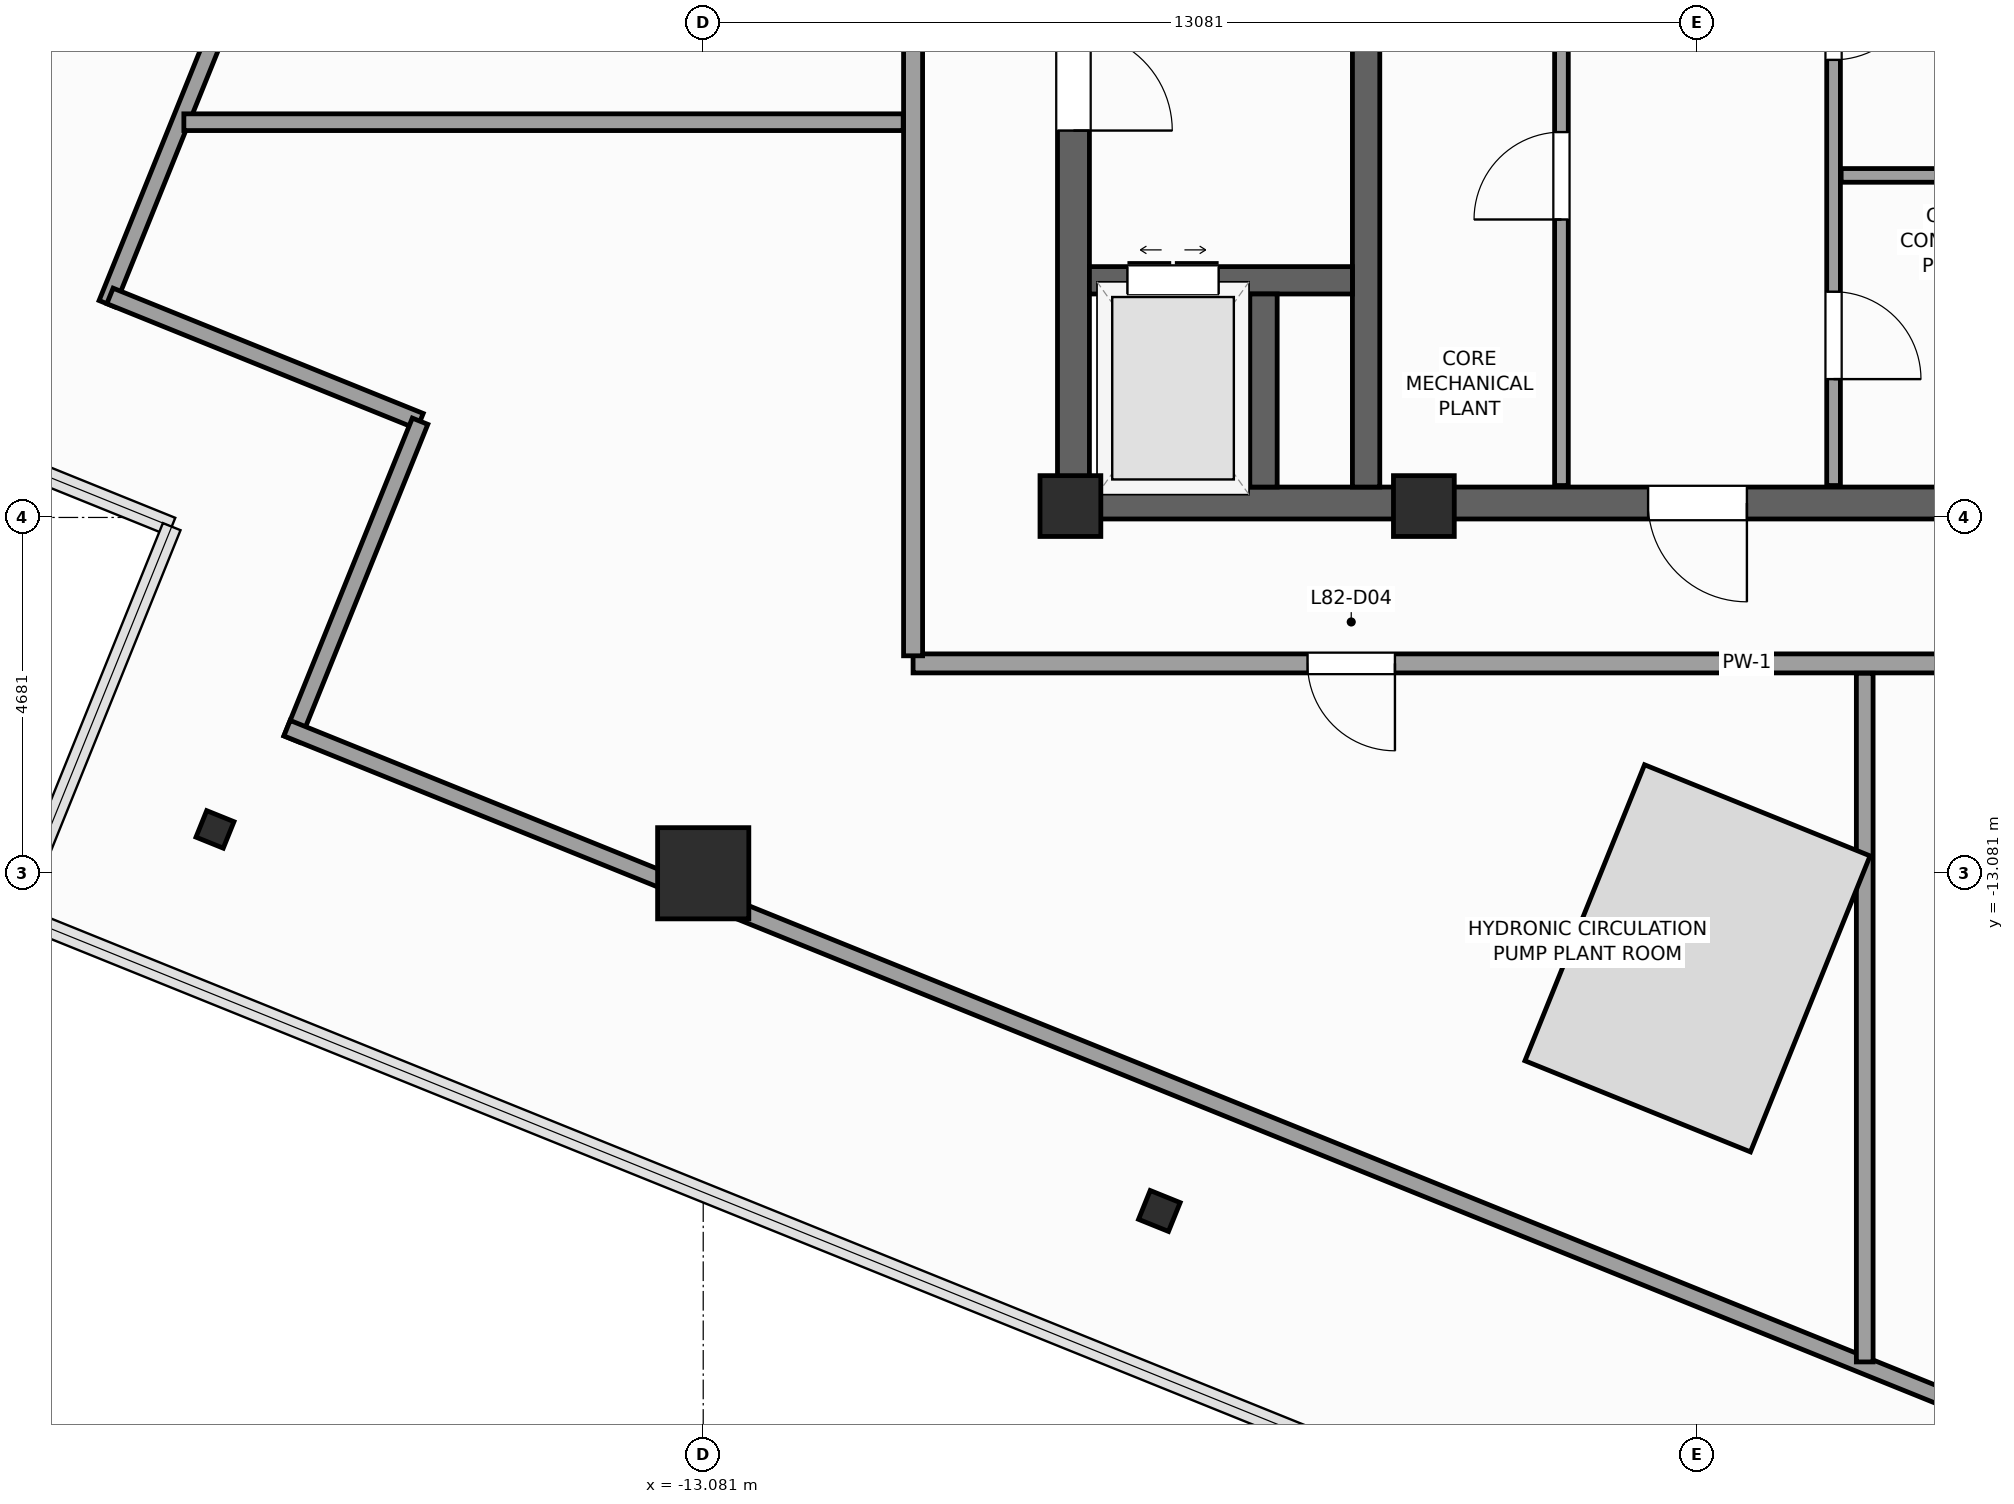
"""IFC4 building model, lengths in metres.
Left out: names, types, materials, properties, quantities, classifications, styles, units other than length and angle.
Written with IfcOpenShell. Run it as: python <this file> out.ifc"""

import sys

from ifc_helpers import new_model, si_unit, direction, frame, frame_2d, origin, origin_2d, place, context, subcontext, project, spatial, rectangle, i_section, extrude, source, transform, mapped, element, fill, save


model = new_model("IFC4")
c1 = context("Model", 3, precision=1e-05, world=origin(), true_north=direction((0.0, 1.0)))
c2 = subcontext(c1, "Body", "Model", "MODEL_VIEW")
j1 = project(units=[si_unit("LENGTHUNIT", "METRE"), si_unit("PLANEANGLEUNIT", "RADIAN")], contexts=[c1])
p1 = place(None, origin())
s1 = spatial("IfcSite", under=j1, at=p1, CompositionType="ELEMENT")
p2 = place(p1, origin())
s2 = spatial("IfcBuilding", under=s1, at=p2, CompositionType="ELEMENT")
p3 = place(p2, frame((0.0, 0.0, 333.6)))
s3 = spatial("IfcBuildingStorey", under=s2, at=p3, CompositionType="ELEMENT", Elevation=333.6)
p4 = place(p3, frame((-8.42, -8.21, 0.0), z_axis=(0.0, 0.0, 1.0), x_axis=(1.0, 0.0, 0.0)))
e1 = element("IfcWall", 1, at=p4, inside=s3, PredefinedType="SHEAR", context=c2, shape_type="SweptSolid", body=[
    extrude(rectangle(XDim=16.84, YDim=0.42, at=frame_2d((8.42, 0.0))), origin(), (0.0, 0.0, 1.0), 4.0),
])
p5 = place(p4, frame((7.77, 0.0, 0.0)))
e2 = element("IfcOpeningElement", 2, at=p5, cuts=e1, PredefinedType="OPENING", context=c2, shape_type="SweptSolid", body=[
    extrude(rectangle(XDim=1.3, YDim=2.2, at=frame_2d((0.65, 1.1))), frame((0.0, 0.22, 0.0), z_axis=(0.0, -1.0, 0.0), x_axis=(1.0, 0.0, 0.0)), (0.0, 0.0, 1.0), 0.44),
])
p6 = place(p3, frame((-8.21, -8.0, 0.0), z_axis=(0.0, 0.0, 1.0), x_axis=(0.0, 1.0, 0.0)))
e3 = element("IfcWall", 3, at=p6, inside=s3, PredefinedType="SHEAR", context=c2, shape_type="SweptSolid", body=[
    extrude(rectangle(XDim=16.0, YDim=0.42, at=frame_2d((8.0, 0.0))), origin(), (0.0, 0.0, 1.0), 4.0),
])
p7 = place(p6, frame((4.69, 0.0, 0.0)))
e4 = element("IfcOpeningElement", 4, at=p7, cuts=e3, PredefinedType="OPENING", context=c2, shape_type="SweptSolid", body=[
    extrude(rectangle(XDim=1.3, YDim=2.2, at=frame_2d((0.65, 1.1))), frame((0.0, 0.22, 0.0), z_axis=(0.0, -1.0, 0.0), x_axis=(1.0, 0.0, 0.0)), (0.0, 0.0, 1.0), 0.44),
])
p8 = place(p3, frame((-4.36, -8.0, 0.0), z_axis=(0.0, 0.0, 1.0), x_axis=(0.0, 1.0, 0.0)))
e5 = element("IfcWall", 5, at=p8, inside=s3, PredefinedType="SHEAR", context=c2, shape_type="SweptSolid", body=[
    extrude(rectangle(XDim=16.0, YDim=0.36, at=frame_2d((8.0, 0.0))), origin(), (0.0, 0.0, 1.0), 4.0),
])
p9 = place(p3, frame((-8.0, -5.28, 0.0), z_axis=(0.0, 0.0, 1.0), x_axis=(1.0, 0.0, 0.0)))
e6 = element("IfcWall", 6, at=p9, inside=s3, PredefinedType="SHEAR", context=c2, shape_type="SweptSolid", body=[
    extrude(rectangle(XDim=3.46, YDim=0.36, at=frame_2d((1.73, 0.0))), origin(), (0.0, 0.0, 1.0), 4.0),
])
p10 = place(p9, frame((0.5, 0.0, 0.0)))
e7 = element("IfcOpeningElement", 7, at=p10, cuts=e6, PredefinedType="OPENING", context=c2, shape_type="SweptSolid", body=[
    extrude(rectangle(XDim=1.2, YDim=2.25, at=frame_2d((0.6, 1.125))), frame((0.0, 0.19, 0.0), z_axis=(0.0, -1.0, 0.0), x_axis=(1.0, 0.0, 0.0)), (0.0, 0.0, 1.0), 0.38),
])
p11 = place(p3, frame((-5.71, -8.0, 0.0), z_axis=(0.0, 0.0, 1.0), x_axis=(0.0, 1.0, 0.0)))
e8 = element("IfcWall", 8, at=p11, inside=s3, PredefinedType="SHEAR", context=c2, shape_type="SweptSolid", body=[
    extrude(rectangle(XDim=2.54, YDim=0.36, at=frame_2d((1.27, 0.0))), origin(), (0.0, 0.0, 1.0), 4.0),
])
m1 = source(origin(), c2, "Body", "SweptSolid", [
    extrude(rectangle(XDim=0.8, YDim=0.8, at=origin_2d()), origin(), (0.0, 0.0, 1.0), 4.0),
])
for number, where, z_axis, x_axis in (
    (9, (-8.25, -8.25, 0.0), (0.0, 0.0, 1.0), (1.0, 0.0, 0.0)),
    (10, (-3.6, -8.25, 0.0), (0.0, 0.0, 1.0), (1.0, 0.0, 0.0)),
):
    element("IfcColumn", number, at=place(p3, frame(where, z_axis=z_axis, x_axis=x_axis)), inside=s3, PredefinedType="PILASTER", context=c2, shape_type="MappedRepresentation", body=[
        mapped(m1, transform((0.0, 0.0, 0.0), scale=1.0)),
    ])
m2 = source(origin(), c2, "Body", "SweptSolid", [
    extrude(rectangle(XDim=1.2, YDim=1.2, at=origin_2d()), origin(), (0.0, 0.0, 1.0), 4.0),
])
p12 = place(p3, frame((-13.081, -13.081, 0.0), z_axis=(0.0, 0.0, 1.0), x_axis=(1.0, 0.0, 0.0)))
e11 = element("IfcColumn", 11, at=p12, inside=s3, PredefinedType="COLUMN", context=c2, shape_type="MappedRepresentation", body=[
    mapped(m2, transform((0.0, 0.0, 0.0), scale=1.0)),
])
m3 = source(origin(), c2, "Body", "SweptSolid", [
    extrude(i_section(OverallWidth=0.376, OverallDepth=0.387, WebThickness=0.02, FlangeThickness=0.032, FilletRadius=0.015, at=origin_2d()), origin(), (0.0, 0.0, 1.0), 4.0),
])
p13 = place(p3, frame((-19.504, -12.504, 0.0), z_axis=(0.0, 0.0, 1.0), x_axis=(0.374606593416, 0.927183854567, 0.0)))
e12 = element("IfcColumn", 12, at=p13, inside=s3, PredefinedType="COLUMN", context=c2, shape_type="MappedRepresentation", body=[
    mapped(m3, transform((0.0, 0.0, 0.0), scale=1.0)),
])
m4 = source(origin(), c2, "Body", "SweptSolid", [
    extrude(i_section(OverallWidth=0.409, OverallDepth=0.425, WebThickness=0.024, FlangeThickness=0.039, FilletRadius=0.015, at=origin_2d()), origin(), (0.0, 0.0, 1.0), 4.0),
])
p14 = place(p3, frame((-7.08, -17.524, 0.0), z_axis=(0.0, 0.0, 1.0), x_axis=(0.374606593416, 0.927183854567, 0.0)))
e13 = element("IfcColumn", 13, at=p14, inside=s3, PredefinedType="COLUMN", context=c2, shape_type="MappedRepresentation", body=[
    mapped(m4, transform((0.0, 0.0, 0.0), scale=1.0)),
])
p15 = place(p3, frame((-1.79, -7.98, 0.0), z_axis=(0.0, 0.0, 1.0), x_axis=(0.0, 1.0, 0.0)))
e14 = element("IfcWall", 14, at=p15, inside=s3, PredefinedType="PARTITIONING", context=c2, shape_type="SweptSolid", body=[
    extrude(rectangle(XDim=12.38, YDim=0.18, at=frame_2d((6.19, 0.0))), origin(), (0.0, 0.0, 1.0), 3.7),
])
p16 = place(p15, frame((3.5, 0.0, 0.0)))
e15 = element("IfcOpeningElement", 15, at=p16, cuts=e14, PredefinedType="OPENING", context=c2, shape_type="SweptSolid", body=[
    extrude(rectangle(XDim=1.15, YDim=2.25, at=frame_2d((0.575, 1.125))), frame((0.0, 0.1, 0.0), z_axis=(0.0, -1.0, 0.0), x_axis=(1.0, 0.0, 0.0)), (0.0, 0.0, 1.0), 0.2),
])
p17 = place(p15, frame((9.8, 0.0, 0.0)))
e16 = element("IfcOpeningElement", 16, at=p17, cuts=e14, PredefinedType="OPENING", context=c2, shape_type="SweptSolid", body=[
    extrude(rectangle(XDim=1.15, YDim=2.25, at=frame_2d((0.575, 1.125))), frame((0.0, 0.1, 0.0), z_axis=(0.0, -1.0, 0.0), x_axis=(1.0, 0.0, 0.0)), (0.0, 0.0, 1.0), 0.2),
])
p18 = place(p3, frame((1.79, -7.98, 0.0), z_axis=(0.0, 0.0, 1.0), x_axis=(0.0, 1.0, 0.0)))
e17 = element("IfcWall", 17, at=p18, inside=s3, PredefinedType="PARTITIONING", context=c2, shape_type="SweptSolid", body=[
    extrude(rectangle(XDim=12.38, YDim=0.18, at=frame_2d((6.19, 0.0))), origin(), (0.0, 0.0, 1.0), 3.7),
])
p19 = place(p18, frame((1.4, 0.0, 0.0)))
e18 = element("IfcOpeningElement", 18, at=p19, cuts=e17, PredefinedType="OPENING", context=c2, shape_type="SweptSolid", body=[
    extrude(rectangle(XDim=1.15, YDim=2.25, at=frame_2d((0.575, 1.125))), frame((0.0, 0.1, 0.0), z_axis=(0.0, -1.0, 0.0), x_axis=(1.0, 0.0, 0.0)), (0.0, 0.0, 1.0), 0.2),
])
p20 = place(p18, frame((5.6, 0.0, 0.0)))
e19 = element("IfcOpeningElement", 19, at=p20, cuts=e17, PredefinedType="OPENING", context=c2, shape_type="SweptSolid", body=[
    extrude(rectangle(XDim=1.15, YDim=2.25, at=frame_2d((0.575, 1.125))), frame((0.0, 0.1, 0.0), z_axis=(0.0, -1.0, 0.0), x_axis=(1.0, 0.0, 0.0)), (0.0, 0.0, 1.0), 0.2),
])
p21 = place(p18, frame((9.8, 0.0, 0.0)))
e20 = element("IfcOpeningElement", 20, at=p21, cuts=e17, PredefinedType="OPENING", context=c2, shape_type="SweptSolid", body=[
    extrude(rectangle(XDim=1.15, YDim=2.25, at=frame_2d((0.575, 1.125))), frame((0.0, 0.1, 0.0), z_axis=(0.0, -1.0, 0.0), x_axis=(1.0, 0.0, 0.0)), (0.0, 0.0, 1.0), 0.2),
])
p22 = place(p3, frame((1.89, -3.9, 0.0), z_axis=(0.0, 0.0, 1.0), x_axis=(1.0, 0.0, 0.0)))
e21 = element("IfcWall", 21, at=p22, inside=s3, PredefinedType="PARTITIONING", context=c2, shape_type="SweptSolid", body=[
    extrude(rectangle(XDim=2.28, YDim=0.18, at=frame_2d((1.14, 0.0))), origin(), (0.0, 0.0, 1.0), 3.7),
])
p23 = place(p3, frame((-11.172, 18.556, 0.0), z_axis=(0.0, 0.0, 1.0), x_axis=(-0.374611707018, -0.927181788521, 0.0)))
e22 = element("IfcWall", 22, at=p23, inside=s3, PredefinedType="PARTITIONING", context=c2, shape_type="SweptSolid", body=[
    extrude(rectangle(XDim=26.04, YDim=0.22, at=frame_2d((13.02, 0.0))), origin(), (0.0, 0.0, 1.0), 3.05),
])
p24 = place(p3, frame((-20.886, -5.486, 0.0), z_axis=(0.0, 0.0, 1.0), x_axis=(0.927189216671, -0.374593321469, 0.0)))
e23 = element("IfcWall", 23, at=p24, inside=s3, PredefinedType="PARTITIONING", context=c2, shape_type="SweptSolid", body=[
    extrude(rectangle(XDim=4.4, YDim=0.22, at=frame_2d((2.2, 0.0))), origin(), (0.0, 0.0, 1.0), 3.7),
])
p25 = place(p3, frame((-16.806, -7.134, 0.0), z_axis=(0.0, 0.0, 1.0), x_axis=(-0.374599091925, -0.927186885331, 0.0)))
e24 = element("IfcWall", 24, at=p25, inside=s3, PredefinedType="PARTITIONING", context=c2, shape_type="SweptSolid", body=[
    extrude(rectangle(XDim=4.51, YDim=0.22, at=frame_2d((2.255, 0.0))), origin(), (0.0, 0.0, 1.0), 3.7),
])
p26 = place(p3, frame((-18.556, -11.172, 0.0), z_axis=(0.0, 0.0, 1.0), x_axis=(0.927181788521, -0.374611707018, 0.0)))
e25 = element("IfcWall", 25, at=p26, inside=s3, PredefinedType="PARTITIONING", context=c2, shape_type="SweptSolid", body=[
    extrude(rectangle(XDim=26.04, YDim=0.22, at=frame_2d((13.02, 0.0))), origin(), (0.0, 0.0, 1.0), 3.05),
])
p27 = place(p3, frame((-10.32, -10.32, 0.0), z_axis=(0.0, 0.0, 1.0), x_axis=(1.0, 0.0, 0.0)))
e26 = element("IfcWall", 26, at=p27, inside=s3, PredefinedType="PARTITIONING", context=c2, shape_type="SweptSolid", body=[
    extrude(rectangle(XDim=21.94, YDim=0.25, at=frame_2d((10.97, 0.0))), origin(), (0.0, 0.0, 1.0), 3.7),
])
p28 = place(p27, frame((16.49, 0.0, 0.0)))
e27 = element("IfcOpeningElement", 27, at=p28, cuts=e26, PredefinedType="OPENING", context=c2, shape_type="SweptSolid", body=[
    extrude(rectangle(XDim=1.15, YDim=2.25, at=frame_2d((0.575, 1.125))), frame((0.0, 0.135, 0.0), z_axis=(0.0, -1.0, 0.0), x_axis=(1.0, 0.0, 0.0)), (0.0, 0.0, 1.0), 0.27),
])
p29 = place(p27, frame((5.189, 0.0, 0.0)))
e28 = element("IfcOpeningElement", 28, at=p29, cuts=e26, PredefinedType="OPENING", context=c2, shape_type="SweptSolid", body=[
    extrude(rectangle(XDim=1.15, YDim=2.25, at=frame_2d((0.575, 1.125))), frame((0.0, 0.135, 0.0), z_axis=(0.0, -1.0, 0.0), x_axis=(1.0, 0.0, 0.0)), (0.0, 0.0, 1.0), 0.27),
])
p30 = place(p3, frame((-10.32, -10.22, 0.0), z_axis=(0.0, 0.0, 1.0), x_axis=(0.0, 1.0, 0.0)))
e29 = element("IfcWall", 29, at=p30, inside=s3, PredefinedType="PARTITIONING", context=c2, shape_type="SweptSolid", body=[
    extrude(rectangle(XDim=21.74, YDim=0.25, at=frame_2d((10.87, 0.0))), origin(), (0.0, 0.0, 1.0), 3.7),
])
p31 = place(p30, frame((13.641, 0.0, 0.0)))
e30 = element("IfcOpeningElement", 30, at=p31, cuts=e29, PredefinedType="OPENING", context=c2, shape_type="SweptSolid", body=[
    extrude(rectangle(XDim=1.15, YDim=2.25, at=frame_2d((0.575, 1.125))), frame((0.0, 0.135, 0.0), z_axis=(0.0, -1.0, 0.0), x_axis=(1.0, 0.0, 0.0)), (0.0, 0.0, 1.0), 0.27),
])
p32 = place(p3, frame((2.2, -10.45, 0.0), z_axis=(0.0, 0.0, 1.0), x_axis=(0.0, -1.0, 0.0)))
e31 = element("IfcWall", 31, at=p32, inside=s3, PredefinedType="PARTITIONING", context=c2, shape_type="SweptSolid", body=[
    extrude(rectangle(XDim=9.06, YDim=0.22, at=frame_2d((4.53, 0.0))), origin(), (0.0, 0.0, 1.0), 3.7),
])
p33 = place(p3, frame((-10.45, -3.2, 0.0), z_axis=(0.0, 0.0, 1.0), x_axis=(-1.0, 0.0, 0.0)))
e32 = element("IfcWall", 32, at=p33, inside=s3, PredefinedType="PARTITIONING", context=c2, shape_type="SweptSolid", body=[
    extrude(rectangle(XDim=9.464, YDim=0.22, at=frame_2d((4.732, 0.0))), origin(), (0.0, 0.0, 1.0), 3.7),
])
m5 = source(origin(), c2, "Body", "SweptSolid", [
    extrude(rectangle(XDim=1.3, YDim=2.2, at=frame_2d((0.65, 1.1))), frame((0.0, 0.025, 0.0), z_axis=(0.0, -1.0, 0.0), x_axis=(1.0, 0.0, 0.0)), (0.0, 0.0, 1.0), 0.05),
])
p34 = place(p7, frame((1.3, 0.0, 0.0), z_axis=(0.0, 0.0, 1.0), x_axis=(-1.0, 0.0, 0.0)))
e33 = element("IfcDoor", 33, at=p34, inside=s3, OperationType="SINGLE_SWING_LEFT", PredefinedType="DOOR", context=c2, shape_type="MappedRepresentation", body=[
    mapped(m5, transform((0.0, 0.0, 0.0), scale=1.0)),
])
fill(e4, e33)
p35 = place(p5, frame((1.3, 0.0, 0.0), z_axis=(0.0, 0.0, 1.0), x_axis=(-1.0, 0.0, 0.0)))
e34 = element("IfcDoor", 34, at=p35, inside=s3, OperationType="SINGLE_SWING_RIGHT", PredefinedType="DOOR", context=c2, shape_type="MappedRepresentation", body=[
    mapped(m5, transform((0.0, 0.0, 0.0), scale=1.0)),
])
fill(e2, e34)
m6 = source(origin(), c2, "Body", "SweptSolid", [
    extrude(rectangle(XDim=1.2, YDim=2.25, at=frame_2d((0.6, 1.125))), frame((0.0, 0.025, 0.0), z_axis=(0.0, -1.0, 0.0), x_axis=(1.0, 0.0, 0.0)), (0.0, 0.0, 1.0), 0.05),
])
p36 = place(p10, origin())
e35 = element("IfcDoor", 35, at=p36, inside=s3, OperationType="DOUBLE_DOOR_SLIDING", PredefinedType="DOOR", context=c2, shape_type="MappedRepresentation", body=[
    mapped(m6, transform((0.0, 0.0, 0.0), scale=1.0)),
])
fill(e7, e35)
m7 = source(origin(), c2, "Body", "SweptSolid", [
    extrude(rectangle(XDim=1.15, YDim=2.25, at=frame_2d((0.575, 1.125))), frame((0.0, 0.025, 0.0), z_axis=(0.0, -1.0, 0.0), x_axis=(1.0, 0.0, 0.0)), (0.0, 0.0, 1.0), 0.05),
])
p37 = place(p16, origin())
e36 = element("IfcDoor", 36, at=p37, inside=s3, OperationType="SINGLE_SWING_LEFT", PredefinedType="DOOR", context=c2, shape_type="MappedRepresentation", body=[
    mapped(m7, transform((0.0, 0.0, 0.0), scale=1.0)),
])
fill(e15, e36)
p38 = place(p19, frame((1.15, 0.0, 0.0), z_axis=(0.0, 0.0, 1.0), x_axis=(-1.0, 0.0, 0.0)))
e37 = element("IfcDoor", 37, at=p38, inside=s3, OperationType="SINGLE_SWING_LEFT", PredefinedType="DOOR", context=c2, shape_type="MappedRepresentation", body=[
    mapped(m7, transform((0.0, 0.0, 0.0), scale=1.0)),
])
fill(e18, e37)
p39 = place(p20, frame((1.15, 0.0, 0.0), z_axis=(0.0, 0.0, 1.0), x_axis=(-1.0, 0.0, 0.0)))
e38 = element("IfcDoor", 38, at=p39, inside=s3, OperationType="SINGLE_SWING_RIGHT", PredefinedType="DOOR", context=c2, shape_type="MappedRepresentation", body=[
    mapped(m7, transform((0.0, 0.0, 0.0), scale=1.0)),
])
fill(e19, e38)
p40 = place(p29, frame((1.15, 0.0, 0.0), z_axis=(0.0, 0.0, 1.0), x_axis=(-1.0, 0.0, 0.0)))
e39 = element("IfcDoor", 39, at=p40, inside=s3, OperationType="SINGLE_SWING_RIGHT", PredefinedType="DOOR", context=c2, shape_type="MappedRepresentation", body=[
    mapped(m7, transform((0.0, 0.0, 0.0), scale=1.0)),
])
fill(e28, e39)
save(model, sys.argv[1])
